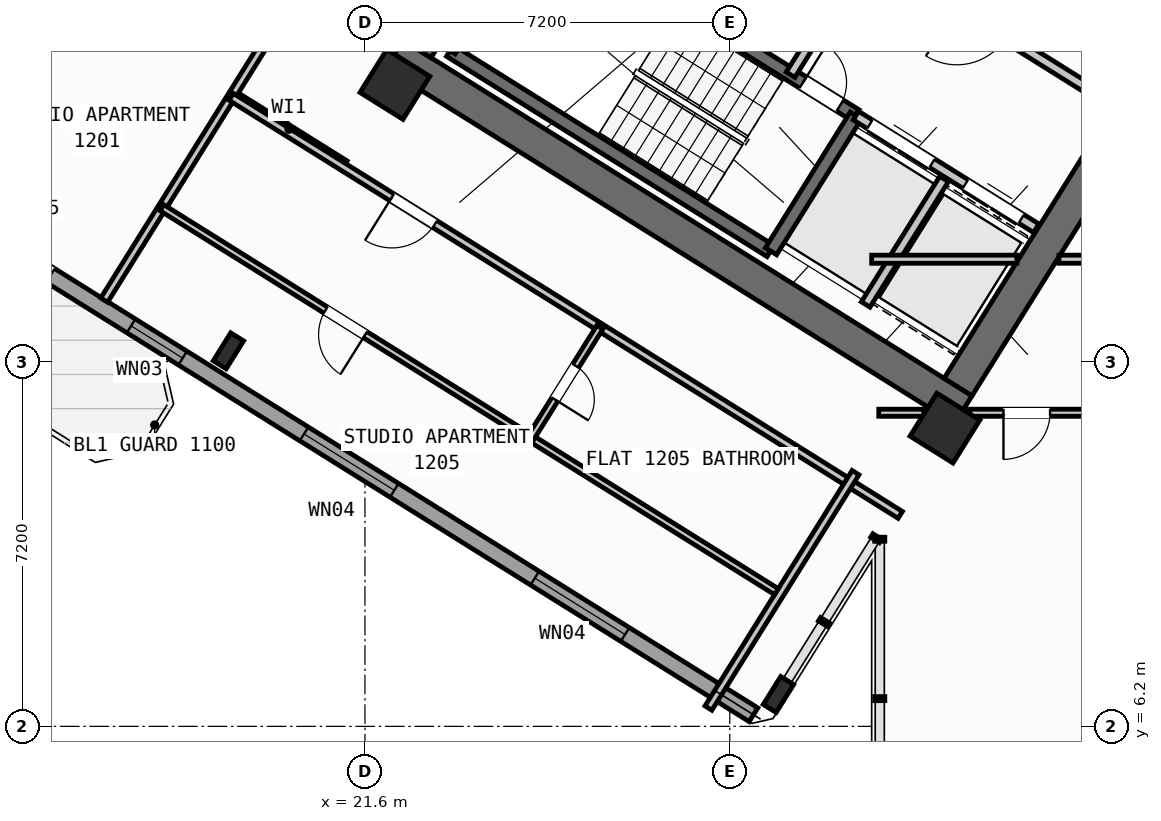
"""IFC4 building model, lengths in metres.
Left out: names, types, materials, properties, quantities, classifications, styles, units other than length and angle.
Written with IfcOpenShell. Run it as: python <this file> out.ifc"""

import sys

from ifc_helpers import new_model, si_unit, direction, frame, frame_2d, origin, origin_2d, place, context, subcontext, project, spatial, rectangle, hollow_rectangle, i_section, extrude, source, transform, mapped, element, fill, save


model = new_model("IFC4")
c1 = context("Model", 3, precision=1e-05, world=origin(), true_north=direction((0.0, 1.0)))
c2 = subcontext(c1, "Body", "Model", "MODEL_VIEW")
j1 = project(units=[si_unit("LENGTHUNIT", "METRE"), si_unit("PLANEANGLEUNIT", "RADIAN")], contexts=[c1])
p1 = place(None, origin())
s1 = spatial("IfcSite", under=j1, at=p1, CompositionType="ELEMENT")
p2 = place(p1, origin())
s2 = spatial("IfcBuilding", under=s1, at=p2, CompositionType="ELEMENT")
p3 = place(p2, frame((0.0, 0.0, 49.2)))
s3 = spatial("IfcBuildingStorey", under=s2, at=p3, CompositionType="ELEMENT", Elevation=49.2)
p4 = place(p3, frame((33.409, 12.45, 0.0), z_axis=(0.0, 0.0, 1.0), x_axis=(-0.848051132073, 0.529914405721, 0.0)))
e1 = element("IfcWall", 1, at=p4, inside=s3, PredefinedType="SHEAR", context=c2, shape_type="SweptSolid", body=[
    extrude(rectangle(XDim=13.24, YDim=0.65, at=frame_2d((6.62, 0.0))), origin(), (0.0, 0.0, 1.0), 3.35),
])
p5 = place(p3, frame((36.683, 18.304, 0.0), z_axis=(0.0, 0.0, 1.0), x_axis=(-0.529899109053, -0.848060690178, 0.0)))
e2 = element("IfcWall", 2, at=p5, inside=s3, PredefinedType="SHEAR", context=c2, shape_type="SweptSolid", body=[
    extrude(rectangle(XDim=6.375, YDim=0.65, at=frame_2d((3.188, 0.0))), origin(), (0.0, 0.0, 1.0), 3.35),
])
p6 = place(p3, frame((26.007, 24.976, 0.0), z_axis=(0.0, 0.0, 1.0), x_axis=(-0.529916319127, -0.848049936456, 0.0)))
e3 = element("IfcWall", 3, at=p6, inside=s3, PredefinedType="SHEAR", context=c2, shape_type="SweptSolid", body=[
    extrude(rectangle(XDim=6.375, YDim=0.65, at=frame_2d((3.188, 0.0))), origin(), (0.0, 0.0, 1.0), 3.35),
])
m1 = source(origin(), c2, "Body", "SweptSolid", [
    extrude(hollow_rectangle(XDim=1.0, YDim=1.0, WallThickness=0.04, at=origin_2d()), origin(), (0.0, 0.0, 1.0), 3.6),
])
p7 = place(p3, frame((33.046, 12.087, 0.0), z_axis=(0.0, 0.0, 1.0), x_axis=(-0.848048096156, 0.529919264233, 0.0)))
e4 = element("IfcColumn", 4, at=p7, inside=s3, PredefinedType="COLUMN", context=c2, shape_type="MappedRepresentation", body=[
    mapped(m1, transform((0.0, 0.0, 0.0), scale=1.0)),
])
m2 = source(origin(), c2, "Body", "SweptSolid", [
    extrude(i_section(OverallWidth=0.3, OverallDepth=0.65, WebThickness=0.016, FlangeThickness=0.031, at=origin_2d()), origin(), (0.0, 0.0, 1.0), 3.6),
])
p8 = place(p3, frame((29.761, 6.829, 0.0), z_axis=(0.0, 0.0, 1.0), x_axis=(-0.848048096156, 0.529919264233, 0.0)))
e5 = element("IfcColumn", 5, at=p8, inside=s3, PredefinedType="COLUMN", context=c2, shape_type="MappedRepresentation", body=[
    mapped(m2, transform((0.0, 0.0, 0.0), scale=1.0)),
])
p9 = place(p3, frame((22.191, 18.87, 0.0), z_axis=(0.0, 0.0, 1.0), x_axis=(-0.848048096156, 0.529919264233, 0.0)))
e6 = element("IfcColumn", 6, at=p9, inside=s3, PredefinedType="COLUMN", context=c2, shape_type="MappedRepresentation", body=[
    mapped(m1, transform((0.0, 0.0, 0.0), scale=1.0)),
])
p10 = place(p3, frame((18.906, 13.612, 0.0), z_axis=(0.0, 0.0, 1.0), x_axis=(-0.848048096156, 0.529919264233, 0.0)))
e7 = element("IfcColumn", 7, at=p10, inside=s3, PredefinedType="COLUMN", context=c2, shape_type="MappedRepresentation", body=[
    mapped(m2, transform((0.0, 0.0, 0.0), scale=1.0)),
])
p11 = place(p3, frame((29.268, 6.429, 0.0), z_axis=(0.0, 0.0, 1.0), x_axis=(-0.848049971435, 0.529916263149, 0.0)))
e8 = element("IfcWall", 8, at=p11, inside=s3, PredefinedType="STANDARD", context=c2, shape_type="SweptSolid", body=[
    extrude(rectangle(XDim=31.588, YDim=0.32, at=frame_2d((15.794, 0.0))), origin(), (0.0, 0.0, 1.0), 3.35),
])
p12 = place(p11, frame((16.362, 0.0, 0.0)))
e9 = element("IfcOpeningElement", 9, at=p12, cuts=e8, PredefinedType="OPENING", context=c2, shape_type="SweptSolid", body=[
    extrude(rectangle(XDim=1.2, YDim=2.15, at=frame_2d((0.6, 1.075))), frame((0.0, 0.17, 0.0), z_axis=(0.0, -1.0, 0.0), x_axis=(1.0, 0.0, 0.0)), (0.0, 0.0, 1.0), 0.34),
])
p13 = place(p11, frame((2.989, 0.0, 0.8)))
e10 = element("IfcOpeningElement", 10, at=p13, cuts=e8, PredefinedType="OPENING", context=c2, shape_type="SweptSolid", body=[
    extrude(rectangle(XDim=2.1, YDim=1.55, at=frame_2d((1.05, 0.775))), frame((0.0, 0.17, 0.0), z_axis=(0.0, -1.0, 0.0), x_axis=(1.0, 0.0, 0.0)), (0.0, 0.0, 1.0), 0.34),
])
p14 = place(p11, frame((8.359, 0.0, 0.8)))
e11 = element("IfcOpeningElement", 11, at=p14, cuts=e8, PredefinedType="OPENING", context=c2, shape_type="SweptSolid", body=[
    extrude(rectangle(XDim=2.1, YDim=1.55, at=frame_2d((1.05, 0.775))), frame((0.0, 0.17, 0.0), z_axis=(0.0, -1.0, 0.0), x_axis=(1.0, 0.0, 0.0)), (0.0, 0.0, 1.0), 0.34),
])
p15 = place(p11, frame((13.284, 0.0, 0.95)))
e12 = element("IfcOpeningElement", 12, at=p15, cuts=e8, PredefinedType="OPENING", context=c2, shape_type="SweptSolid", body=[
    extrude(rectangle(XDim=1.2, YDim=1.4, at=frame_2d((0.6, 0.7))), frame((0.0, 0.17, 0.0), z_axis=(0.0, -1.0, 0.0), x_axis=(1.0, 0.0, 0.0)), (0.0, 0.0, 1.0), 0.34),
])
p16 = place(p11, frame((20.259, 0.0, 0.95)))
e13 = element("IfcOpeningElement", 13, at=p16, cuts=e8, PredefinedType="OPENING", context=c2, shape_type="SweptSolid", body=[
    extrude(rectangle(XDim=1.2, YDim=1.4, at=frame_2d((0.6, 0.7))), frame((0.0, 0.17, 0.0), z_axis=(0.0, -1.0, 0.0), x_axis=(1.0, 0.0, 0.0)), (0.0, 0.0, 1.0), 0.34),
])
p17 = place(p11, frame((22.929, 0.0, 0.95)))
e14 = element("IfcOpeningElement", 14, at=p17, cuts=e8, PredefinedType="OPENING", context=c2, shape_type="SweptSolid", body=[
    extrude(rectangle(XDim=1.2, YDim=1.4, at=frame_2d((0.6, 0.7))), frame((0.0, 0.17, 0.0), z_axis=(0.0, -1.0, 0.0), x_axis=(1.0, 0.0, 0.0)), (0.0, 0.0, 1.0), 0.34),
])
p18 = place(p11, frame((26.106, 0.0, 0.85)))
e15 = element("IfcOpeningElement", 15, at=p18, cuts=e8, PredefinedType="OPENING", context=c2, shape_type="SweptSolid", body=[
    extrude(rectangle(XDim=1.5, YDim=1.5, at=frame_2d((0.75, 0.75))), frame((0.0, 0.17, 0.0), z_axis=(0.0, -1.0, 0.0), x_axis=(1.0, 0.0, 0.0)), (0.0, 0.0, 1.0), 0.34),
])
p19 = place(p11, frame((29.068, 0.0, 0.85)))
e16 = element("IfcOpeningElement", 16, at=p19, cuts=e8, PredefinedType="OPENING", context=c2, shape_type="SweptSolid", body=[
    extrude(rectangle(XDim=1.8, YDim=1.5, at=frame_2d((0.9, 0.75))), frame((0.0, 0.17, 0.0), z_axis=(0.0, -1.0, 0.0), x_axis=(1.0, 0.0, 0.0)), (0.0, 0.0, 1.0), 0.34),
])
p20 = place(p3, frame((29.605, 15.581, 0.0), z_axis=(0.0, 0.0, 1.0), x_axis=(-0.848036911448, 0.529937163087, 0.0)))
e17 = element("IfcWall", 17, at=p20, inside=s3, PredefinedType="SHEAR", context=c2, shape_type="SweptSolid", body=[
    extrude(rectangle(XDim=7.46, YDim=0.26, at=frame_2d((3.73, 0.0))), origin(), (0.0, 0.0, 1.0), 3.35),
])
p21 = place(p3, frame((31.28, 18.261, 0.0), z_axis=(0.0, 0.0, 1.0), x_axis=(-0.848051618787, 0.529913626805, 0.0)))
e18 = element("IfcWall", 18, at=p21, inside=s3, PredefinedType="SHEAR", context=c2, shape_type="SweptSolid", body=[
    extrude(rectangle(XDim=7.46, YDim=0.26, at=frame_2d((3.73, 0.0))), origin(), (0.0, 0.0, 1.0), 3.35),
])
p22 = place(p21, frame((0.36, 0.0, 0.0)))
e19 = element("IfcOpeningElement", 19, at=p22, cuts=e18, PredefinedType="OPENING", context=c2, shape_type="SweptSolid", body=[
    extrude(rectangle(XDim=0.86, YDim=2.05, at=frame_2d((0.43, 1.025))), frame((0.0, 0.14, 0.0), z_axis=(0.0, -1.0, 0.0), x_axis=(1.0, 0.0, 0.0)), (0.0, 0.0, 1.0), 0.28),
])
p23 = place(p3, frame((31.288, 18.256, 0.0), z_axis=(0.0, 0.0, 1.0), x_axis=(-0.529943379326, -0.848033026897, 0.0)))
e20 = element("IfcWall", 20, at=p23, inside=s3, PredefinedType="SHEAR", context=c2, shape_type="SweptSolid", body=[
    extrude(rectangle(XDim=3.16, YDim=0.26, at=frame_2d((1.58, 0.0))), origin(), (0.0, 0.0, 1.0), 3.35),
])
p24 = place(p3, frame((24.945, 22.22, 0.0), z_axis=(0.0, 0.0, 1.0), x_axis=(-0.529908658664, -0.84805472316, 0.0)))
e21 = element("IfcWall", 21, at=p24, inside=s3, PredefinedType="SHEAR", context=c2, shape_type="SweptSolid", body=[
    extrude(rectangle(XDim=3.16, YDim=0.26, at=frame_2d((1.58, 0.0))), origin(), (0.0, 0.0, 1.0), 3.35),
])
p25 = place(p3, frame((34.848, 16.031, 0.0), z_axis=(0.0, 0.0, 1.0), x_axis=(-0.848044042236, 0.529925751807, 0.0)))
e22 = element("IfcWall", 22, at=p25, inside=s3, PredefinedType="STANDARD", context=c2, shape_type="SweptSolid", body=[
    extrude(rectangle(XDim=4.198, YDim=0.2, at=frame_2d((2.099, 0.0))), origin(), (0.0, 0.0, 1.0), 3.34),
])
p26 = place(p25, frame((0.348, 0.0, 0.0)))
e23 = element("IfcOpeningElement", 23, at=p26, cuts=e22, PredefinedType="OPENING", context=c2, shape_type="SweptSolid", body=[
    extrude(rectangle(XDim=1.3, YDim=2.2, at=frame_2d((0.65, 1.1))), frame((0.0, 0.11, 0.0), z_axis=(0.0, -1.0, 0.0), x_axis=(1.0, 0.0, 0.0)), (0.0, 0.0, 1.0), 0.22),
])
p27 = place(p25, frame((2.423, 0.0, 0.0)))
e24 = element("IfcOpeningElement", 24, at=p27, cuts=e22, PredefinedType="OPENING", context=c2, shape_type="SweptSolid", body=[
    extrude(rectangle(XDim=1.45, YDim=2.25, at=frame_2d((0.725, 1.125))), frame((0.0, 0.11, 0.0), z_axis=(0.0, -1.0, 0.0), x_axis=(1.0, 0.0, 0.0)), (0.0, 0.0, 1.0), 0.22),
])
p28 = place(p3, frame((36.374, 18.474, 0.0), z_axis=(0.0, 0.0, 1.0), x_axis=(-0.848051071577, 0.529914502535, 0.0)))
e25 = element("IfcWall", 25, at=p28, inside=s3, PredefinedType="STANDARD", context=c2, shape_type="SweptSolid", body=[
    extrude(rectangle(XDim=5.718, YDim=0.2, at=frame_2d((2.859, 0.0))), origin(), (0.0, 0.0, 1.0), 3.34),
])
p29 = place(p28, frame((2.498, 0.0, 0.0)))
e26 = element("IfcOpeningElement", 26, at=p29, cuts=e25, PredefinedType="OPENING", context=c2, shape_type="SweptSolid", body=[
    extrude(rectangle(XDim=1.15, YDim=2.1, at=frame_2d((0.575, 1.05))), frame((0.0, 0.11, 0.0), z_axis=(0.0, -1.0, 0.0), x_axis=(1.0, 0.0, 0.0)), (0.0, 0.0, 1.0), 0.22),
])
p30 = place(p3, frame((33.029, 17.003, 0.0), z_axis=(0.0, 0.0, 1.0), x_axis=(-0.529916267533, -0.848049968695, 0.0)))
e27 = element("IfcWall", 27, at=p30, inside=s3, PredefinedType="STANDARD", context=c2, shape_type="SweptSolid", body=[
    extrude(rectangle(XDim=2.92, YDim=0.2, at=frame_2d((1.46, 0.0))), origin(), (0.0, 0.0, 1.0), 3.34),
])
p31 = place(p3, frame((31.525, 21.504, 0.0), z_axis=(0.0, 0.0, 1.0), x_axis=(-0.529907497854, -0.848055448493, 0.0)))
e28 = element("IfcWall", 28, at=p31, inside=s3, PredefinedType="STANDARD", context=c2, shape_type="SweptSolid", body=[
    extrude(rectangle(XDim=2.88, YDim=0.2, at=frame_2d((1.44, 0.0))), origin(), (0.0, 0.0, 1.0), 3.34),
])
p32 = place(p3, frame((21.206, 17.292, 0.0), z_axis=(0.0, 0.0, 1.0), x_axis=(-0.848050851465, 0.529914854792, 0.0)))
e29 = element("IfcWall", 29, at=p32, inside=s3, PredefinedType="PARTITIONING", context=c2, shape_type="SweptSolid", body=[
    extrude(rectangle(XDim=2.61, YDim=0.16, at=frame_2d((1.305, 0.0))), origin(), (0.0, 0.0, 1.0), 3.34),
])
p33 = place(p3, frame((21.938, 23.391, 0.0), z_axis=(0.0, 0.0, 1.0), x_axis=(-0.529924725692, -0.848044683434, 0.0)))
e30 = element("IfcWall", 30, at=p33, inside=s3, PredefinedType="PARTITIONING", context=c2, shape_type="SweptSolid", body=[
    extrude(rectangle(XDim=10.35, YDim=0.16, at=frame_2d((5.175, 0.0))), origin(), (0.0, 0.0, 1.0), 3.34),
])
p34 = place(p3, frame((16.492, 21.827, 0.0), z_axis=(0.0, 0.0, 1.0), x_axis=(-0.529904608059, -0.848057254175, 0.0)))
e31 = element("IfcWall", 31, at=p34, inside=s3, PredefinedType="PARTITIONING", context=c2, shape_type="SweptSolid", body=[
    extrude(rectangle(XDim=5.351, YDim=0.16, at=frame_2d((2.675, 0.0))), origin(), (0.0, 0.0, 1.0), 2.725),
])
p35 = place(p3, frame((32.164, 10.374, 0.0), z_axis=(0.0, 0.0, 1.0), x_axis=(-0.848044107957, 0.529925646633, 0.0)))
e32 = element("IfcWall", 32, at=p35, inside=s3, PredefinedType="PARTITIONING", context=c2, shape_type="SweptSolid", body=[
    extrude(rectangle(XDim=15.57, YDim=0.16, at=frame_2d((7.785, 0.0))), origin(), (0.0, 0.0, 1.0), 3.34),
])
p36 = place(p35, frame((10.83, 0.0, 0.0)))
e33 = element("IfcOpeningElement", 33, at=p36, cuts=e32, PredefinedType="OPENING", context=c2, shape_type="SweptSolid", body=[
    extrude(rectangle(XDim=1.0, YDim=2.1, at=frame_2d((0.5, 1.05))), frame((0.0, 0.09, 0.0), z_axis=(0.0, -1.0, 0.0), x_axis=(1.0, 0.0, 0.0)), (0.0, 0.0, 1.0), 0.18),
])
p37 = place(p3, frame((31.282, 11.208, 0.0), z_axis=(0.0, 0.0, 1.0), x_axis=(-0.529938869374, -0.84803584519, 0.0)))
e34 = element("IfcWall", 34, at=p37, inside=s3, PredefinedType="PARTITIONING", context=c2, shape_type="SweptSolid", body=[
    extrude(rectangle(XDim=5.48, YDim=0.16, at=frame_2d((2.74, 0.0))), origin(), (0.0, 0.0, 1.0), 3.34),
])
p38 = place(p3, frame((29.72, 8.859, 0.0), z_axis=(0.0, 0.0, 1.0), x_axis=(-0.848049134363, 0.529917602752, 0.0)))
e35 = element("IfcWall", 35, at=p38, inside=s3, PredefinedType="PLUMBINGWALL", context=c2, shape_type="SweptSolid", body=[
    extrude(rectangle(XDim=14.3, YDim=0.14, at=frame_2d((7.15, 0.0))), origin(), (0.0, 0.0, 1.0), 3.34),
])
p39 = place(p38, frame((9.57, 0.0, 0.0)))
e36 = element("IfcOpeningElement", 36, at=p39, cuts=e35, PredefinedType="OPENING", context=c2, shape_type="SweptSolid", body=[
    extrude(rectangle(XDim=0.92, YDim=2.08, at=frame_2d((0.46, 1.04))), frame((0.0, 0.08, 0.0), z_axis=(0.0, -1.0, 0.0), x_axis=(1.0, 0.0, 0.0)), (0.0, 0.0, 1.0), 0.16),
])
p40 = place(p3, frame((26.237, 14.078, 0.0), z_axis=(0.0, 0.0, 1.0), x_axis=(-0.52995640672, -0.848024885824, 0.0)))
e37 = element("IfcWall", 37, at=p40, inside=s3, PredefinedType="PLUMBINGWALL", context=c2, shape_type="SweptSolid", body=[
    extrude(rectangle(XDim=2.58, YDim=0.14, at=frame_2d((1.29, 0.0))), origin(), (0.0, 0.0, 1.0), 3.34),
])
p41 = place(p40, frame((0.9, 0.0, 0.0)))
e38 = element("IfcOpeningElement", 38, at=p41, cuts=e37, PredefinedType="OPENING", context=c2, shape_type="SweptSolid", body=[
    extrude(rectangle(XDim=0.78, YDim=2.05, at=frame_2d((0.39, 1.025))), frame((0.0, 0.08, 0.0), z_axis=(0.0, -1.0, 0.0), x_axis=(1.0, 0.0, 0.0)), (0.0, 0.0, 1.0), 0.16),
])
p42 = place(p3, frame((31.6, 15.42, 0.0), z_axis=(0.0, 0.0, 1.0), x_axis=(1.0, 0.0, 0.0)))
e39 = element("IfcWall", 39, at=p42, inside=s3, PredefinedType="PARTITIONING", context=c2, shape_type="SweptSolid", body=[
    extrude(rectangle(XDim=2.866, YDim=0.16, at=frame_2d((1.433, 0.0))), origin(), (0.0, 0.0, 1.0), 3.34),
])
p43 = place(p3, frame((35.296, 15.42, 0.0), z_axis=(0.0, 0.0, 1.0), x_axis=(1.0, 0.0, 0.0)))
e40 = element("IfcWall", 40, at=p43, inside=s3, PredefinedType="PARTITIONING", context=c2, shape_type="SweptSolid", body=[
    extrude(rectangle(XDim=15.311, YDim=0.16, at=frame_2d((7.655, 0.0))), origin(), (0.0, 0.0, 1.0), 3.34),
])
p44 = place(p43, frame((0.615, 0.0, 0.0)))
e41 = element("IfcOpeningElement", 41, at=p44, cuts=e40, PredefinedType="OPENING", context=c2, shape_type="SweptSolid", body=[
    extrude(rectangle(XDim=1.0, YDim=2.1, at=frame_2d((0.5, 1.05))), frame((0.0, 0.09, 0.0), z_axis=(0.0, -1.0, 0.0), x_axis=(1.0, 0.0, 0.0)), (0.0, 0.0, 1.0), 0.18),
])
p45 = place(p43, frame((9.035, 0.0, 0.0)))
e42 = element("IfcOpeningElement", 42, at=p45, cuts=e40, PredefinedType="OPENING", context=c2, shape_type="SweptSolid", body=[
    extrude(rectangle(XDim=1.0, YDim=2.1, at=frame_2d((0.5, 1.05))), frame((0.0, 0.09, 0.0), z_axis=(0.0, -1.0, 0.0), x_axis=(1.0, 0.0, 0.0)), (0.0, 0.0, 1.0), 0.18),
])
p46 = place(p3, frame((31.74, 12.39, 0.0), z_axis=(0.0, 0.0, 1.0), x_axis=(1.0, 0.0, 0.0)))
e43 = element("IfcWall", 43, at=p46, inside=s3, PredefinedType="PLUMBINGWALL", context=c2, shape_type="SweptSolid", body=[
    extrude(rectangle(XDim=0.892, YDim=0.14, at=frame_2d((0.446, 0.0))), origin(), (0.0, 0.0, 1.0), 3.34),
])
p47 = place(p3, frame((33.527, 12.39, 0.0), z_axis=(0.0, 0.0, 1.0), x_axis=(1.0, 0.0, 0.0)))
e44 = element("IfcWall", 44, at=p47, inside=s3, PredefinedType="PLUMBINGWALL", context=c2, shape_type="SweptSolid", body=[
    extrude(rectangle(XDim=3.695, YDim=0.14, at=frame_2d((1.847, 0.0))), origin(), (0.0, 0.0, 1.0), 2.525),
])
p48 = place(p47, frame((0.674, 0.0, 0.0)))
e45 = element("IfcOpeningElement", 45, at=p48, cuts=e44, PredefinedType="OPENING", context=c2, shape_type="SweptSolid", body=[
    extrude(rectangle(XDim=0.92, YDim=2.08, at=frame_2d((0.46, 1.04))), frame((0.0, 0.08, 0.0), z_axis=(0.0, -1.0, 0.0), x_axis=(1.0, 0.0, 0.0)), (0.0, 0.0, 1.0), 0.16),
])
m3 = source(origin(), c2, "Body", "SweptSolid", [
    extrude(rectangle(XDim=2.1, YDim=1.55, at=frame_2d((1.05, 0.775))), frame((0.0, 0.03, 0.0), z_axis=(0.0, -1.0, 0.0), x_axis=(1.0, 0.0, 0.0)), (0.0, 0.0, 1.0), 0.06),
])
p49 = place(p13, origin())
e46 = element("IfcWindow", 46, at=p49, inside=s3, PartitioningType="SINGLE_PANEL", PredefinedType="WINDOW", context=c2, shape_type="MappedRepresentation", body=[
    mapped(m3, transform((0.0, 0.0, 0.0), scale=1.0)),
])
fill(e10, e46)
p50 = place(p14, origin())
e47 = element("IfcWindow", 47, at=p50, inside=s3, PartitioningType="SINGLE_PANEL", PredefinedType="WINDOW", context=c2, shape_type="MappedRepresentation", body=[
    mapped(m3, transform((0.0, 0.0, 0.0), scale=1.0)),
])
fill(e11, e47)
m4 = source(origin(), c2, "Body", "SweptSolid", [
    extrude(rectangle(XDim=1.2, YDim=1.4, at=frame_2d((0.6, 0.7))), frame((0.0, 0.03, 0.0), z_axis=(0.0, -1.0, 0.0), x_axis=(1.0, 0.0, 0.0)), (0.0, 0.0, 1.0), 0.06),
])
p51 = place(p15, origin())
e48 = element("IfcWindow", 48, at=p51, inside=s3, PartitioningType="SINGLE_PANEL", PredefinedType="WINDOW", context=c2, shape_type="MappedRepresentation", body=[
    mapped(m4, transform((0.0, 0.0, 0.0), scale=1.0)),
])
fill(e12, e48)
m5 = source(origin(), c2, "Body", "SweptSolid", [
    extrude(rectangle(XDim=0.86, YDim=2.05, at=frame_2d((0.43, 1.025))), frame((0.0, 0.025, 0.0), z_axis=(0.0, -1.0, 0.0), x_axis=(1.0, 0.0, 0.0)), (0.0, 0.0, 1.0), 0.05),
])
p52 = place(p22, frame((0.86, 0.0, 0.0), z_axis=(0.0, 0.0, 1.0), x_axis=(-1.0, 0.0, 0.0)))
e49 = element("IfcDoor", 49, at=p52, inside=s3, OperationType="SINGLE_SWING_LEFT", PredefinedType="DOOR", context=c2, shape_type="MappedRepresentation", body=[
    mapped(m5, transform((0.0, 0.0, 0.0), scale=1.0)),
])
fill(e19, e49)
m6 = source(origin(), c2, "Body", "SweptSolid", [
    extrude(rectangle(XDim=1.3, YDim=2.2, at=frame_2d((0.65, 1.1))), frame((0.0, 0.025, 0.0), z_axis=(0.0, -1.0, 0.0), x_axis=(1.0, 0.0, 0.0)), (0.0, 0.0, 1.0), 0.05),
])
p53 = place(p26, origin())
e50 = element("IfcDoor", 50, at=p53, inside=s3, OperationType="DOUBLE_DOOR_SLIDING", PredefinedType="DOOR", context=c2, shape_type="MappedRepresentation", body=[
    mapped(m6, transform((0.0, 0.0, 0.0), scale=1.0)),
])
fill(e23, e50)
m7 = source(origin(), c2, "Body", "SweptSolid", [
    extrude(rectangle(XDim=1.45, YDim=2.25, at=frame_2d((0.725, 1.125))), frame((0.0, 0.025, 0.0), z_axis=(0.0, -1.0, 0.0), x_axis=(1.0, 0.0, 0.0)), (0.0, 0.0, 1.0), 0.05),
])
p54 = place(p27, origin())
e51 = element("IfcDoor", 51, at=p54, inside=s3, OperationType="DOUBLE_DOOR_SLIDING", PredefinedType="DOOR", context=c2, shape_type="MappedRepresentation", body=[
    mapped(m7, transform((0.0, 0.0, 0.0), scale=1.0)),
])
fill(e24, e51)
m8 = source(origin(), c2, "Body", "SweptSolid", [
    extrude(rectangle(XDim=1.0, YDim=2.1, at=frame_2d((0.5, 1.05))), frame((0.0, 0.025, 0.0), z_axis=(0.0, -1.0, 0.0), x_axis=(1.0, 0.0, 0.0)), (0.0, 0.0, 1.0), 0.05),
])
p55 = place(p36, origin())
e52 = element("IfcDoor", 52, at=p55, inside=s3, OperationType="SINGLE_SWING_RIGHT", PredefinedType="DOOR", context=c2, shape_type="MappedRepresentation", body=[
    mapped(m8, transform((0.0, 0.0, 0.0), scale=1.0)),
])
fill(e33, e52)
m9 = source(origin(), c2, "Body", "SweptSolid", [
    extrude(rectangle(XDim=0.92, YDim=2.08, at=frame_2d((0.46, 1.04))), frame((0.0, 0.025, 0.0), z_axis=(0.0, -1.0, 0.0), x_axis=(1.0, 0.0, 0.0)), (0.0, 0.0, 1.0), 0.05),
])
p56 = place(p39, origin())
e53 = element("IfcDoor", 53, at=p56, inside=s3, OperationType="SINGLE_SWING_LEFT", PredefinedType="DOOR", context=c2, shape_type="MappedRepresentation", body=[
    mapped(m9, transform((0.0, 0.0, 0.0), scale=1.0)),
])
fill(e36, e53)
m10 = source(origin(), c2, "Body", "SweptSolid", [
    extrude(rectangle(XDim=0.78, YDim=2.05, at=frame_2d((0.39, 1.025))), frame((0.0, 0.025, 0.0), z_axis=(0.0, -1.0, 0.0), x_axis=(1.0, 0.0, 0.0)), (0.0, 0.0, 1.0), 0.05),
])
p57 = place(p41, origin())
e54 = element("IfcDoor", 54, at=p57, inside=s3, OperationType="SINGLE_SWING_RIGHT", PredefinedType="DOOR", context=c2, shape_type="MappedRepresentation", body=[
    mapped(m10, transform((0.0, 0.0, 0.0), scale=1.0)),
])
fill(e38, e54)
p58 = place(p48, frame((0.92, 0.0, 0.0), z_axis=(0.0, 0.0, 1.0), x_axis=(-1.0, 0.0, 0.0)))
e55 = element("IfcDoor", 55, at=p58, inside=s3, OperationType="SINGLE_SWING_RIGHT", PredefinedType="DOOR", context=c2, shape_type="MappedRepresentation", body=[
    mapped(m9, transform((0.0, 0.0, 0.0), scale=1.0)),
])
fill(e45, e55)
save(model, sys.argv[1])
